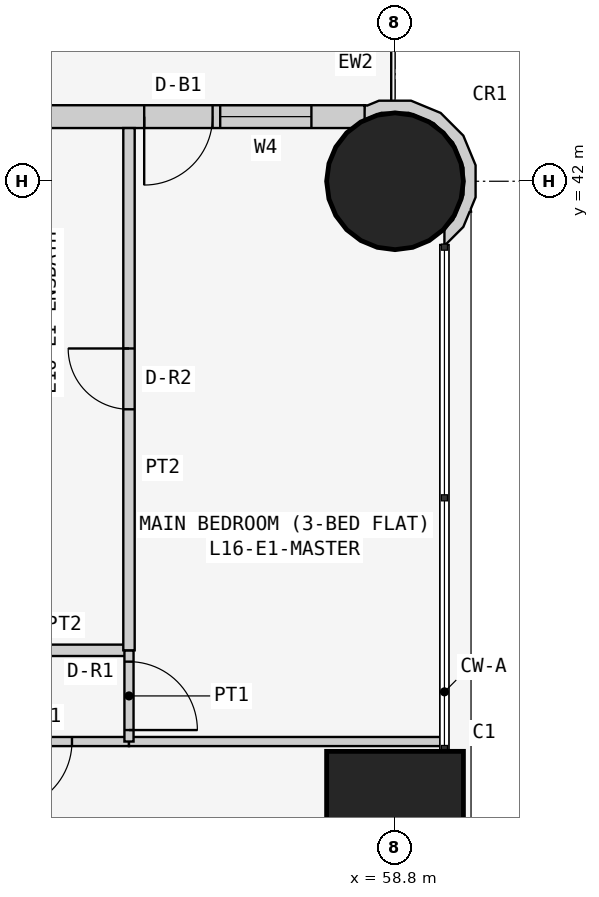
"""IFC4 building model, lengths in metres.
Left out: names, types, materials, properties, quantities, classifications, styles, units other than length and angle.
Written with IfcOpenShell. Run it as: python <this file> out.ifc"""

import sys

from ifc_helpers import new_model, si_unit, direction, frame, frame_2d, origin, origin_2d, place, context, subcontext, project, spatial, polyline, rectangle, circle, outline, extrude, element, fill, save


model = new_model("IFC4")
c1 = context("Model", 3, precision=1e-05, world=origin(), true_north=direction((0.0, 1.0)))
c2 = subcontext(c1, "Body", "Model", "MODEL_VIEW")
j1 = project(units=[si_unit("LENGTHUNIT", "METRE"), si_unit("PLANEANGLEUNIT", "RADIAN")], contexts=[c1])
p1 = place(None, origin())
s1 = spatial("IfcSite", under=j1, at=p1, CompositionType="ELEMENT")
p2 = place(p1, origin())
s2 = spatial("IfcBuilding", under=s1, at=p2, CompositionType="ELEMENT")
p3 = place(p2, frame((0.0, 0.0, 66.9)))
s3 = spatial("IfcBuildingStorey", under=s2, at=p3, CompositionType="ELEMENT", Elevation=66.9)
p4 = place(p3, frame((58.8, 33.6, 0.0), z_axis=(0.0, 0.0, 1.0), x_axis=(1.0, 0.0, 0.0)))
e1 = element("IfcColumn", 1, at=p4, inside=s3, PredefinedType="COLUMN", context=c2, shape_type="SweptSolid", body=[
    extrude(rectangle(XDim=1.8, YDim=1.8, at=origin_2d()), origin(), (0.0, 0.0, 1.0), 3.6),
])
p5 = place(p3, frame((58.8, 42.0, 0.0), z_axis=(0.0, 0.0, 1.0), x_axis=(1.0, 0.0, 0.0)))
e2 = element("IfcColumn", 2, at=p5, inside=s3, PredefinedType="COLUMN", context=c2, shape_type="SweptSolid", body=[
    extrude(circle(Radius=0.9, at=origin_2d()), origin(), (0.0, 0.0, 1.0), 3.6),
])
p6 = place(p3, frame((58.4, 42.85, 0.0), z_axis=(0.0, 0.0, 1.0), x_axis=(-1.0, 0.0, 0.0)))
e3 = element("IfcWall", 3, at=p6, inside=s3, PredefinedType="SOLIDWALL", context=c2, shape_type="SweptSolid", body=[
    extrude(rectangle(XDim=15.7, YDim=0.3, at=frame_2d((7.85, 0.0))), origin(), (0.0, 0.0, 1.0), 3.45),
])
p7 = place(p6, frame((12.4, 0.0, 0.9)))
e4 = element("IfcOpeningElement", 4, at=p7, cuts=e3, PredefinedType="OPENING", context=c2, shape_type="SweptSolid", body=[
    extrude(rectangle(XDim=1.8, YDim=1.5, at=frame_2d((0.9, 0.75))), frame((0.0, 0.16, 0.0), z_axis=(0.0, -1.0, 0.0), x_axis=(1.0, 0.0, 0.0)), (0.0, 0.0, 1.0), 0.32),
])
p8 = place(p6, frame((9.55, 0.0, 1.5)))
e5 = element("IfcOpeningElement", 5, at=p8, cuts=e3, PredefinedType="OPENING", context=c2, shape_type="SweptSolid", body=[
    extrude(rectangle(XDim=0.9, YDim=0.7, at=frame_2d((0.45, 0.35))), frame((0.0, 0.16, 0.0), z_axis=(0.0, -1.0, 0.0), x_axis=(1.0, 0.0, 0.0)), (0.0, 0.0, 1.0), 0.32),
])
p9 = place(p6, frame((5.1, 0.0, 0.9)))
e6 = element("IfcOpeningElement", 6, at=p9, cuts=e3, PredefinedType="OPENING", context=c2, shape_type="SweptSolid", body=[
    extrude(rectangle(XDim=1.8, YDim=1.5, at=frame_2d((0.9, 0.75))), frame((0.0, 0.16, 0.0), z_axis=(0.0, -1.0, 0.0), x_axis=(1.0, 0.0, 0.0)), (0.0, 0.0, 1.0), 0.32),
])
p10 = place(p6, frame((2.0, 0.0, 0.0)))
e7 = element("IfcOpeningElement", 7, at=p10, cuts=e3, PredefinedType="OPENING", context=c2, shape_type="SweptSolid", body=[
    extrude(rectangle(XDim=0.9, YDim=2.4, at=frame_2d((0.45, 1.2))), frame((0.0, 0.16, 0.0), z_axis=(0.0, -1.0, 0.0), x_axis=(1.0, 0.0, 0.0)), (0.0, 0.0, 1.0), 0.32),
])
p11 = place(p6, frame((0.7, 0.0, 0.9)))
e8 = element("IfcOpeningElement", 8, at=p11, cuts=e3, PredefinedType="OPENING", context=c2, shape_type="SweptSolid", body=[
    extrude(rectangle(XDim=1.2, YDim=1.5, at=frame_2d((0.6, 0.75))), frame((0.0, 0.16, 0.0), z_axis=(0.0, -1.0, 0.0), x_axis=(1.0, 0.0, 0.0)), (0.0, 0.0, 1.0), 0.32),
])
p12 = place(p3, frame((59.411, 41.233, 0.0), z_axis=(0.0, 0.0, 1.0), x_axis=(0.926129809145, 0.377204953059, 0.0)))
e9 = element("IfcWall", 9, at=p12, inside=s3, PredefinedType="SOLIDWALL", context=c2, shape_type="SweptSolid", body=[
    extrude(outline(polyline([(0.626, 0.345), (0.785, 0.736), (0.782, 1.157), (0.619, 1.546), (0.319, 1.843), (-0.072, 2.002), (-0.24, 2.001), (-0.27, 2.017), (-0.37, 1.841), (-0.102, 1.842), (0.23, 1.707), (0.485, 1.455), (0.624, 1.125), (0.626, 0.766), (0.491, 0.434), (0.238, 0.179), (0.09, 0.117), (0.011, -0.078), (0.024, -0.083), (0.329, 0.045), (0.48, 0.198), (0.499, 0.193), (0.508, 0.225), (0.626, 0.345)])), origin(), (0.0, 0.0, 1.0), 3.45),
])
p13 = place(p3, frame((55.3, 34.629, 0.0), z_axis=(0.0, 0.0, 1.0), x_axis=(-1.0, 0.0, 0.0)))
e10 = element("IfcWall", 10, at=p13, inside=s3, PredefinedType="PARTITIONING", context=c2, shape_type="SweptSolid", body=[
    extrude(rectangle(XDim=3.9, YDim=0.12, at=frame_2d((1.95, 0.0))), origin(), (0.0, 0.0, 1.0), 3.45),
])
p14 = place(p13, frame((0.75, 0.0, 0.0)))
e11 = element("IfcOpeningElement", 11, at=p14, cuts=e10, PredefinedType="OPENING", context=c2, shape_type="SweptSolid", body=[
    extrude(rectangle(XDim=0.9, YDim=2.1, at=frame_2d((0.45, 1.05))), frame((0.0, 0.07, 0.0), z_axis=(0.0, -1.0, 0.0), x_axis=(1.0, 0.0, 0.0)), (0.0, 0.0, 1.0), 0.14),
])
p15 = place(p3, frame((59.45, 34.629, 0.0), z_axis=(0.0, 0.0, 1.0), x_axis=(-1.0, 0.0, 0.0)))
e12 = element("IfcWall", 12, at=p15, inside=s3, PredefinedType="PARTITIONING", context=c2, shape_type="SweptSolid", body=[
    extrude(rectangle(XDim=4.15, YDim=0.12, at=frame_2d((2.075, 0.0))), origin(), (0.0, 0.0, 1.0), 3.45),
])
p16 = place(p3, frame((55.3, 35.829, 0.0), z_axis=(0.0, 0.0, 1.0), x_axis=(-1.0, 0.0, 0.0)))
e13 = element("IfcWall", 13, at=p16, inside=s3, PredefinedType="PARTITIONING", context=c2, shape_type="SweptSolid", body=[
    extrude(rectangle(XDim=1.7, YDim=0.15, at=frame_2d((0.85, 0.0))), origin(), (0.0, 0.0, 1.0), 3.45),
])
p17 = place(p3, frame((55.3, 34.629, 0.0), z_axis=(0.0, 0.0, 1.0), x_axis=(0.0, 1.0, 0.0)))
e14 = element("IfcWall", 14, at=p17, inside=s3, PredefinedType="PARTITIONING", context=c2, shape_type="SweptSolid", body=[
    extrude(rectangle(XDim=1.2, YDim=0.12, at=frame_2d((0.6, 0.0))), origin(), (0.0, 0.0, 1.0), 3.45),
])
p18 = place(p17, frame((0.151, 0.0, 0.0)))
e15 = element("IfcOpeningElement", 15, at=p18, cuts=e14, PredefinedType="OPENING", context=c2, shape_type="SweptSolid", body=[
    extrude(rectangle(XDim=0.9, YDim=2.1, at=frame_2d((0.45, 1.05))), frame((0.0, 0.07, 0.0), z_axis=(0.0, -1.0, 0.0), x_axis=(1.0, 0.0, 0.0)), (0.0, 0.0, 1.0), 0.14),
])
p19 = place(p3, frame((55.3, 35.829, 0.0), z_axis=(0.0, 0.0, 1.0), x_axis=(0.0, 1.0, 0.0)))
e16 = element("IfcWall", 16, at=p19, inside=s3, PredefinedType="PARTITIONING", context=c2, shape_type="SweptSolid", body=[
    extrude(rectangle(XDim=6.871, YDim=0.15, at=frame_2d((3.436, 0.0))), origin(), (0.0, 0.0, 1.0), 3.45),
])
p20 = place(p19, frame((3.171, 0.0, 0.0)))
e17 = element("IfcOpeningElement", 17, at=p20, cuts=e16, PredefinedType="OPENING", context=c2, shape_type="SweptSolid", body=[
    extrude(rectangle(XDim=0.8, YDim=2.1, at=frame_2d((0.4, 1.05))), frame((0.0, 0.085, 0.0), z_axis=(0.0, -1.0, 0.0), x_axis=(1.0, 0.0, 0.0)), (0.0, 0.0, 1.0), 0.17),
])
p21 = place(p10, origin())
e18 = element("IfcDoor", 18, at=p21, inside=s3, OperationType="SINGLE_SWING_RIGHT", PredefinedType="DOOR", context=c2, shape_type="SweptSolid", body=[
    extrude(rectangle(XDim=0.9, YDim=2.4, at=frame_2d((0.45, 1.2))), frame((0.0, 0.025, 0.0), z_axis=(0.0, -1.0, 0.0), x_axis=(1.0, 0.0, 0.0)), (0.0, 0.0, 1.0), 0.05),
])
fill(e7, e18)
p22 = place(p11, origin())
e19 = element("IfcWindow", 19, at=p22, inside=s3, PartitioningType="SINGLE_PANEL", PredefinedType="WINDOW", context=c2, shape_type="SweptSolid", body=[
    extrude(rectangle(XDim=1.2, YDim=1.5, at=frame_2d((0.6, 0.75))), frame((0.0, 0.03, 0.0), z_axis=(0.0, -1.0, 0.0), x_axis=(1.0, 0.0, 0.0)), (0.0, 0.0, 1.0), 0.06),
])
fill(e8, e19)
p23 = place(p14, origin())
e20 = element("IfcDoor", 20, at=p23, inside=s3, OperationType="SINGLE_SWING_RIGHT", PredefinedType="DOOR", context=c2, shape_type="SweptSolid", body=[
    extrude(rectangle(XDim=0.9, YDim=2.1, at=frame_2d((0.45, 1.05))), frame((0.0, 0.025, 0.0), z_axis=(0.0, -1.0, 0.0), x_axis=(1.0, 0.0, 0.0)), (0.0, 0.0, 1.0), 0.05),
])
fill(e11, e20)
p24 = place(p18, frame((0.9, 0.0, 0.0), z_axis=(0.0, 0.0, 1.0), x_axis=(-1.0, 0.0, 0.0)))
e21 = element("IfcDoor", 21, at=p24, inside=s3, OperationType="SINGLE_SWING_RIGHT", PredefinedType="DOOR", context=c2, shape_type="SweptSolid", body=[
    extrude(rectangle(XDim=0.9, YDim=2.1, at=frame_2d((0.45, 1.05))), frame((0.0, 0.025, 0.0), z_axis=(0.0, -1.0, 0.0), x_axis=(1.0, 0.0, 0.0)), (0.0, 0.0, 1.0), 0.05),
])
fill(e15, e21)
p25 = place(p20, origin())
e22 = element("IfcDoor", 22, at=p25, inside=s3, OperationType="SINGLE_SWING_RIGHT", PredefinedType="DOOR", context=c2, shape_type="SweptSolid", body=[
    extrude(rectangle(XDim=0.8, YDim=2.1, at=frame_2d((0.4, 1.05))), frame((0.0, 0.025, 0.0), z_axis=(0.0, -1.0, 0.0), x_axis=(1.0, 0.0, 0.0)), (0.0, 0.0, 1.0), 0.05),
])
fill(e17, e22)
save(model, sys.argv[1])
